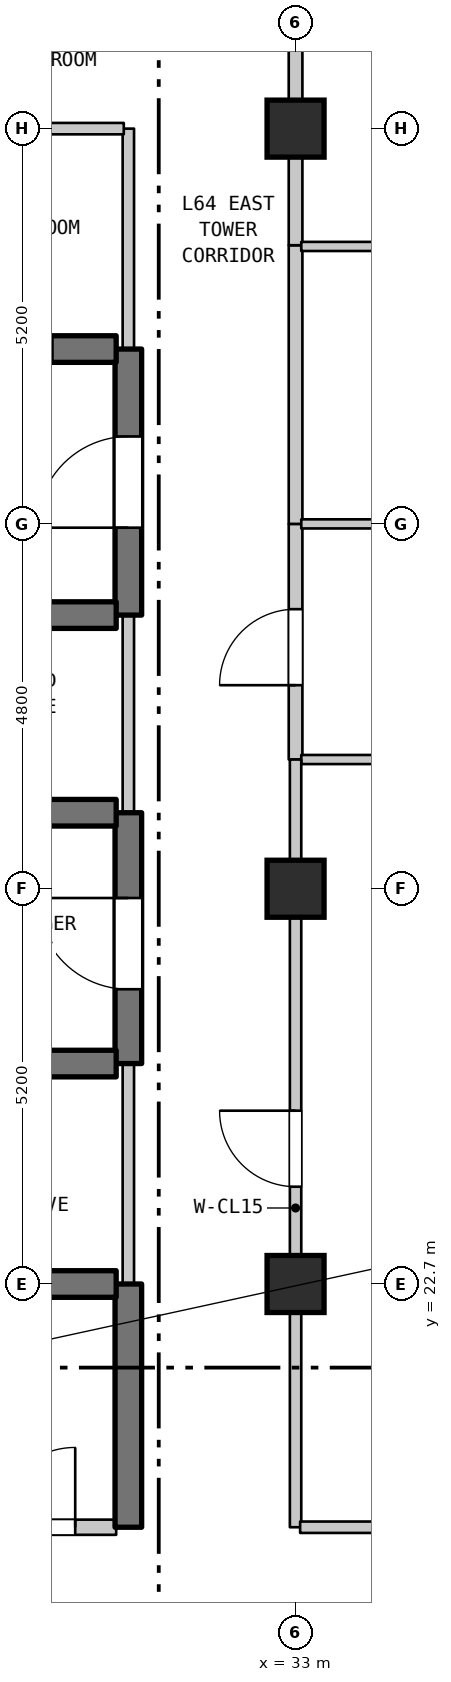
"""IFC4 building model, lengths in metres.
Left out: names, types, materials, properties, quantities, classifications, styles, units other than length and angle.
Written with IfcOpenShell. Run it as: python <this file> out.ifc"""

import sys

from ifc_helpers import new_model, si_unit, direction, frame, frame_2d, origin, origin_2d, place, context, subcontext, project, spatial, rectangle, extrude, element, fill, save


model = new_model("IFC4")
c1 = context("Model", 3, precision=1e-05, world=origin(), true_north=direction((0.0, 1.0)))
c2 = subcontext(c1, "Body", "Model", "MODEL_VIEW")
j1 = project(units=[si_unit("LENGTHUNIT", "METRE"), si_unit("PLANEANGLEUNIT", "RADIAN")], contexts=[c1])
p1 = place(None, origin())
s1 = spatial("IfcSite", under=j1, at=p1, CompositionType="ELEMENT")
p2 = place(p1, origin())
s2 = spatial("IfcBuilding", under=s1, at=p2, CompositionType="ELEMENT")
p3 = place(p2, frame((0.0, 0.0, 258.4)))
s3 = spatial("IfcBuildingStorey", under=s2, at=p3, CompositionType="ELEMENT", Elevation=258.4)
for number, where, z_axis, x_axis in (
    (1, (33.0, 22.7, 0.0), (0.0, 0.0, 1.0), (1.0, 0.0, 0.0)),
    (2, (33.0, 27.9, 0.0), (0.0, 0.0, 1.0), (1.0, 0.0, 0.0)),
    (3, (33.0, 37.9, 0.0), (0.0, 0.0, 1.0), (1.0, 0.0, 0.0)),
):
    element("IfcColumn", number, at=place(p3, frame(where, z_axis=z_axis, x_axis=x_axis)), inside=s3, PredefinedType="COLUMN", context=c2, shape_type="SweptSolid", body=[
        extrude(rectangle(XDim=0.75, YDim=0.75, at=origin_2d()), origin(), (0.0, 0.0, 1.0), 3.7),
    ])
p4 = place(p3, frame((30.8, 19.5, 0.0), z_axis=(0.0, 0.0, 1.0), x_axis=(0.0, 1.0, 0.0)))
e4 = element("IfcWall", 4, at=p4, inside=s3, PredefinedType="SHEAR", context=c2, shape_type="SweptSolid", body=[
    extrude(rectangle(XDim=3.2, YDim=0.35, at=frame_2d((1.6, 0.0))), origin(), (0.0, 0.0, 1.0), 3.39),
])
p5 = place(p3, frame((30.8, 22.7, 0.0), z_axis=(0.0, 0.0, 1.0), x_axis=(0.0, 1.0, 0.0)))
e5 = element("IfcWall", 5, at=p5, inside=s3, PredefinedType="STANDARD", context=c2, shape_type="SweptSolid", body=[
    extrude(rectangle(XDim=2.9, YDim=0.15, at=frame_2d((1.45, 0.0))), origin(), (0.0, 0.0, 1.0), 3.39),
])
p6 = place(p3, frame((30.8, 25.6, 0.0), z_axis=(0.0, 0.0, 1.0), x_axis=(0.0, 1.0, 0.0)))
e6 = element("IfcWall", 6, at=p6, inside=s3, PredefinedType="SHEAR", context=c2, shape_type="SweptSolid", body=[
    extrude(rectangle(XDim=3.3, YDim=0.35, at=frame_2d((1.65, 0.0))), origin(), (0.0, 0.0, 1.0), 3.39),
])
p7 = place(p6, frame((0.978, 0.0, 0.0)))
e7 = element("IfcOpeningElement", 7, at=p7, cuts=e6, PredefinedType="OPENING", context=c2, shape_type="SweptSolid", body=[
    extrude(rectangle(XDim=1.2, YDim=2.2, at=frame_2d((0.6, 1.1))), frame((0.0, 0.185, 0.0), z_axis=(0.0, -1.0, 0.0), x_axis=(1.0, 0.0, 0.0)), (0.0, 0.0, 1.0), 0.37),
])
p8 = place(p3, frame((30.8, 28.9, 0.0), z_axis=(0.0, 0.0, 1.0), x_axis=(0.0, 1.0, 0.0)))
e8 = element("IfcWall", 8, at=p8, inside=s3, PredefinedType="STANDARD", context=c2, shape_type="SweptSolid", body=[
    extrude(rectangle(XDim=2.6, YDim=0.15, at=frame_2d((1.3, 0.0))), origin(), (0.0, 0.0, 1.0), 3.39),
])
p9 = place(p3, frame((30.8, 31.5, 0.0), z_axis=(0.0, 0.0, 1.0), x_axis=(0.0, 1.0, 0.0)))
e9 = element("IfcWall", 9, at=p9, inside=s3, PredefinedType="SHEAR", context=c2, shape_type="SweptSolid", body=[
    extrude(rectangle(XDim=3.5, YDim=0.35, at=frame_2d((1.75, 0.0))), origin(), (0.0, 0.0, 1.0), 3.39),
])
p10 = place(p9, frame((1.15, 0.0, 0.0)))
e10 = element("IfcOpeningElement", 10, at=p10, cuts=e9, PredefinedType="OPENING", context=c2, shape_type="SweptSolid", body=[
    extrude(rectangle(XDim=1.2, YDim=2.2, at=frame_2d((0.6, 1.1))), frame((0.0, 0.185, 0.0), z_axis=(0.0, -1.0, 0.0), x_axis=(1.0, 0.0, 0.0)), (0.0, 0.0, 1.0), 0.37),
])
p11 = place(p3, frame((30.8, 35.0, 0.0), z_axis=(0.0, 0.0, 1.0), x_axis=(0.0, 1.0, 0.0)))
e11 = element("IfcWall", 11, at=p11, inside=s3, PredefinedType="STANDARD", context=c2, shape_type="SweptSolid", body=[
    extrude(rectangle(XDim=2.9, YDim=0.15, at=frame_2d((1.45, 0.0))), origin(), (0.0, 0.0, 1.0), 3.39),
])
p12 = place(p3, frame((33.0, 19.5, 0.0), z_axis=(0.0, 0.0, 1.0), x_axis=(0.0, 1.0, 0.0)))
e12 = element("IfcWall", 12, at=p12, inside=s3, PredefinedType="STANDARD", context=c2, shape_type="SweptSolid", body=[
    extrude(rectangle(XDim=8.4, YDim=0.15, at=frame_2d((4.2, 0.0))), origin(), (0.0, 0.0, 1.0), 3.1),
])
p13 = place(p12, frame((4.48, 0.0, 0.0)))
e13 = element("IfcOpeningElement", 13, at=p13, cuts=e12, PredefinedType="OPENING", context=c2, shape_type="SweptSolid", body=[
    extrude(rectangle(XDim=1.0, YDim=2.15, at=frame_2d((0.5, 1.075))), frame((0.0, 0.085, 0.0), z_axis=(0.0, -1.0, 0.0), x_axis=(1.0, 0.0, 0.0)), (0.0, 0.0, 1.0), 0.17),
])
p14 = place(p3, frame((33.0, 29.6, 0.0), z_axis=(0.0, 0.0, 1.0), x_axis=(0.0, 1.0, 0.0)))
e14 = element("IfcWall", 14, at=p14, inside=s3, PredefinedType="STANDARD", context=c2, shape_type="SweptSolid", body=[
    extrude(rectangle(XDim=3.1, YDim=0.18, at=frame_2d((1.55, 0.0))), origin(), (0.0, 0.0, 1.0), 2.89),
])
p15 = place(p14, frame((0.978, 0.0, 0.0)))
e15 = element("IfcOpeningElement", 15, at=p15, cuts=e14, PredefinedType="OPENING", context=c2, shape_type="SweptSolid", body=[
    extrude(rectangle(XDim=1.0, YDim=2.15, at=frame_2d((0.5, 1.075))), frame((0.0, 0.1, 0.0), z_axis=(0.0, -1.0, 0.0), x_axis=(1.0, 0.0, 0.0)), (0.0, 0.0, 1.0), 0.2),
])
p16 = place(p3, frame((33.0, 32.7, 0.0), z_axis=(0.0, 0.0, 1.0), x_axis=(0.0, 1.0, 0.0)))
e16 = element("IfcWall", 16, at=p16, inside=s3, PredefinedType="STANDARD", context=c2, shape_type="SweptSolid", body=[
    extrude(rectangle(XDim=3.666, YDim=0.18, at=frame_2d((1.833, 0.0))), origin(), (0.0, 0.0, 1.0), 2.89),
])
p17 = place(p3, frame((33.0, 36.366, 0.0), z_axis=(0.0, 0.0, 1.0), x_axis=(0.0, 1.0, 0.0)))
e17 = element("IfcWall", 17, at=p17, inside=s3, PredefinedType="STANDARD", context=c2, shape_type="SweptSolid", body=[
    extrude(rectangle(XDim=1.534, YDim=0.18, at=frame_2d((0.767, 0.0))), origin(), (0.0, 0.0, 1.0), 2.89),
])
p18 = place(p3, frame((28.585, 19.5, 0.0), z_axis=(0.0, 0.0, 1.0), x_axis=(1.0, 0.0, 0.0)))
e18 = element("IfcWall", 18, at=p18, inside=s3, PredefinedType="STANDARD", context=c2, shape_type="SweptSolid", body=[
    extrude(rectangle(XDim=2.055, YDim=0.2, at=frame_2d((1.027, 0.0))), origin(), (0.0, 0.0, 1.0), 3.39),
])
p19 = place(p18, frame((0.466, 0.0, 0.0)))
e19 = element("IfcOpeningElement", 19, at=p19, cuts=e18, PredefinedType="OPENING", context=c2, shape_type="SweptSolid", body=[
    extrude(rectangle(XDim=1.05, YDim=2.15, at=frame_2d((0.525, 1.075))), frame((0.0, 0.11, 0.0), z_axis=(0.0, -1.0, 0.0), x_axis=(1.0, 0.0, 0.0)), (0.0, 0.0, 1.0), 0.22),
])
p20 = place(p3, frame((33.06, 19.5, 0.0), z_axis=(0.0, 0.0, 1.0), x_axis=(1.0, 0.0, 0.0)))
e20 = element("IfcWall", 20, at=p20, inside=s3, PredefinedType="STANDARD", context=c2, shape_type="SweptSolid", body=[
    extrude(rectangle(XDim=8.323, YDim=0.15, at=frame_2d((4.162, 0.0))), origin(), (0.0, 0.0, 1.0), 3.39),
])
p21 = place(p20, frame((3.583, 0.0, 0.0)))
e21 = element("IfcOpeningElement", 21, at=p21, cuts=e20, PredefinedType="OPENING", context=c2, shape_type="SweptSolid", body=[
    extrude(rectangle(XDim=1.0, YDim=2.15, at=frame_2d((0.5, 1.075))), frame((0.0, 0.085, 0.0), z_axis=(0.0, -1.0, 0.0), x_axis=(1.0, 0.0, 0.0)), (0.0, 0.0, 1.0), 0.17),
])
p22 = place(p3, frame((28.585, 22.7, 0.0), z_axis=(0.0, 0.0, 1.0), x_axis=(1.0, 0.0, 0.0)))
e22 = element("IfcWall", 22, at=p22, inside=s3, PredefinedType="SHEAR", context=c2, shape_type="SweptSolid", body=[
    extrude(rectangle(XDim=2.055, YDim=0.35, at=frame_2d((1.027, 0.0))), origin(), (0.0, 0.0, 1.0), 3.39),
])
p23 = place(p3, frame((27.46, 25.6, 0.0), z_axis=(0.0, 0.0, 1.0), x_axis=(1.0, 0.0, 0.0)))
e23 = element("IfcWall", 23, at=p23, inside=s3, PredefinedType="SHEAR", context=c2, shape_type="SweptSolid", body=[
    extrude(rectangle(XDim=3.18, YDim=0.35, at=frame_2d((1.59, 0.0))), origin(), (0.0, 0.0, 1.0), 3.39),
])
p24 = place(p23, frame((1.115, 0.0, 0.0)))
e24 = element("IfcOpeningElement", 24, at=p24, cuts=e23, PredefinedType="OPENING", context=c2, shape_type="SweptSolid", body=[
    extrude(rectangle(XDim=0.95, YDim=2.15, at=frame_2d((0.475, 1.075))), frame((0.0, 0.185, 0.0), z_axis=(0.0, -1.0, 0.0), x_axis=(1.0, 0.0, 0.0)), (0.0, 0.0, 1.0), 0.37),
])
p25 = place(p3, frame((27.46, 28.9, 0.0), z_axis=(0.0, 0.0, 1.0), x_axis=(1.0, 0.0, 0.0)))
e25 = element("IfcWall", 25, at=p25, inside=s3, PredefinedType="SHEAR", context=c2, shape_type="SweptSolid", body=[
    extrude(rectangle(XDim=3.18, YDim=0.35, at=frame_2d((1.59, 0.0))), origin(), (0.0, 0.0, 1.0), 3.39),
])
p26 = place(p25, frame((1.115, 0.0, 0.0)))
e26 = element("IfcOpeningElement", 26, at=p26, cuts=e25, PredefinedType="OPENING", context=c2, shape_type="SweptSolid", body=[
    extrude(rectangle(XDim=0.95, YDim=2.15, at=frame_2d((0.475, 1.075))), frame((0.0, 0.185, 0.0), z_axis=(0.0, -1.0, 0.0), x_axis=(1.0, 0.0, 0.0)), (0.0, 0.0, 1.0), 0.37),
])
p27 = place(p3, frame((33.075, 29.6, 0.0), z_axis=(0.0, 0.0, 1.0), x_axis=(1.0, 0.0, 0.0)))
e27 = element("IfcWall", 27, at=p27, inside=s3, PredefinedType="PARTITIONING", context=c2, shape_type="SweptSolid", body=[
    extrude(rectangle(XDim=11.522, YDim=0.12, at=frame_2d((5.761, 0.0))), origin(), (0.0, 0.0, 1.0), 3.39),
])
p28 = place(p3, frame((27.46, 31.5, 0.0), z_axis=(0.0, 0.0, 1.0), x_axis=(1.0, 0.0, 0.0)))
e28 = element("IfcWall", 28, at=p28, inside=s3, PredefinedType="SHEAR", context=c2, shape_type="SweptSolid", body=[
    extrude(rectangle(XDim=3.18, YDim=0.35, at=frame_2d((1.59, 0.0))), origin(), (0.0, 0.0, 1.0), 3.39),
])
p29 = place(p3, frame((33.075, 32.7, 0.0), z_axis=(0.0, 0.0, 1.0), x_axis=(1.0, 0.0, 0.0)))
e29 = element("IfcWall", 29, at=p29, inside=s3, PredefinedType="PARTITIONING", context=c2, shape_type="SweptSolid", body=[
    extrude(rectangle(XDim=4.46, YDim=0.12, at=frame_2d((2.23, 0.0))), origin(), (0.0, 0.0, 1.0), 3.39),
])
p30 = place(p3, frame((28.045, 35.0, 0.0), z_axis=(0.0, 0.0, 1.0), x_axis=(1.0, 0.0, 0.0)))
e30 = element("IfcWall", 30, at=p30, inside=s3, PredefinedType="SHEAR", context=c2, shape_type="SweptSolid", body=[
    extrude(rectangle(XDim=2.595, YDim=0.35, at=frame_2d((1.297, 0.0))), origin(), (0.0, 0.0, 1.0), 3.39),
])
p31 = place(p30, frame((0.806, 0.0, 0.0)))
e31 = element("IfcOpeningElement", 31, at=p31, cuts=e30, PredefinedType="OPENING", context=c2, shape_type="SweptSolid", body=[
    extrude(rectangle(XDim=0.95, YDim=2.15, at=frame_2d((0.475, 1.075))), frame((0.0, 0.185, 0.0), z_axis=(0.0, -1.0, 0.0), x_axis=(1.0, 0.0, 0.0)), (0.0, 0.0, 1.0), 0.37),
])
p32 = place(p3, frame((33.075, 36.35, 0.0), z_axis=(0.0, 0.0, 1.0), x_axis=(1.0, 0.0, 0.0)))
e32 = element("IfcWall", 32, at=p32, inside=s3, PredefinedType="PARTITIONING", context=c2, shape_type="SweptSolid", body=[
    extrude(rectangle(XDim=4.46, YDim=0.12, at=frame_2d((2.23, 0.0))), origin(), (0.0, 0.0, 1.0), 3.39),
])
p33 = place(p3, frame((28.045, 37.9, 0.0), z_axis=(0.0, 0.0, 1.0), x_axis=(1.0, 0.0, 0.0)))
e33 = element("IfcWall", 33, at=p33, inside=s3, PredefinedType="STANDARD", context=c2, shape_type="SweptSolid", body=[
    extrude(rectangle(XDim=2.695, YDim=0.15, at=frame_2d((1.348, 0.0))), origin(), (0.0, 0.0, 1.0), 2.89),
])
p34 = place(p3, frame((33.0, 27.9, 0.0), z_axis=(0.0, 0.0, 1.0), x_axis=(0.0, 1.0, 0.0)))
e34 = element("IfcWall", 34, at=p34, inside=s3, PredefinedType="STANDARD", context=c2, shape_type="SweptSolid", body=[
    extrude(rectangle(XDim=1.7, YDim=0.15, at=frame_2d((0.85, 0.0))), origin(), (0.0, 0.0, 1.0), 2.89),
])
p35 = place(p3, frame((33.0, 37.9, 0.0), z_axis=(0.0, 0.0, 1.0), x_axis=(0.0, 1.0, 0.0)))
e35 = element("IfcWall", 35, at=p35, inside=s3, PredefinedType="STANDARD", context=c2, shape_type="SweptSolid", body=[
    extrude(rectangle(XDim=1.85, YDim=0.18, at=frame_2d((0.925, 0.0))), origin(), (0.0, 0.0, 1.0), 2.79),
])
p36 = place(p7, origin())
e36 = element("IfcDoor", 36, at=p36, inside=s3, OperationType="SINGLE_SWING_RIGHT", PredefinedType="DOOR", context=c2, shape_type="SweptSolid", body=[
    extrude(rectangle(XDim=1.2, YDim=2.2, at=frame_2d((0.6, 1.1))), frame((0.0, 0.025, 0.0), z_axis=(0.0, -1.0, 0.0), x_axis=(1.0, 0.0, 0.0)), (0.0, 0.0, 1.0), 0.05),
])
fill(e7, e36)
p37 = place(p10, origin())
e37 = element("IfcDoor", 37, at=p37, inside=s3, OperationType="SINGLE_SWING_LEFT", PredefinedType="DOOR", context=c2, shape_type="SweptSolid", body=[
    extrude(rectangle(XDim=1.2, YDim=2.2, at=frame_2d((0.6, 1.1))), frame((0.0, 0.025, 0.0), z_axis=(0.0, -1.0, 0.0), x_axis=(1.0, 0.0, 0.0)), (0.0, 0.0, 1.0), 0.05),
])
fill(e10, e37)
p38 = place(p13, origin())
e38 = element("IfcDoor", 38, at=p38, inside=s3, OperationType="SINGLE_SWING_RIGHT", PredefinedType="DOOR", context=c2, shape_type="SweptSolid", body=[
    extrude(rectangle(XDim=1.0, YDim=2.15, at=frame_2d((0.5, 1.075))), frame((0.0, 0.025, 0.0), z_axis=(0.0, -1.0, 0.0), x_axis=(1.0, 0.0, 0.0)), (0.0, 0.0, 1.0), 0.05),
])
fill(e13, e38)
p39 = place(p15, origin())
e39 = element("IfcDoor", 39, at=p39, inside=s3, OperationType="SINGLE_SWING_LEFT", PredefinedType="DOOR", context=c2, shape_type="SweptSolid", body=[
    extrude(rectangle(XDim=1.0, YDim=2.15, at=frame_2d((0.5, 1.075))), frame((0.0, 0.025, 0.0), z_axis=(0.0, -1.0, 0.0), x_axis=(1.0, 0.0, 0.0)), (0.0, 0.0, 1.0), 0.05),
])
fill(e15, e39)
p40 = place(p19, origin())
e40 = element("IfcDoor", 40, at=p40, inside=s3, OperationType="SINGLE_SWING_RIGHT", PredefinedType="DOOR", context=c2, shape_type="SweptSolid", body=[
    extrude(rectangle(XDim=1.05, YDim=2.15, at=frame_2d((0.525, 1.075))), frame((0.0, 0.025, 0.0), z_axis=(0.0, -1.0, 0.0), x_axis=(1.0, 0.0, 0.0)), (0.0, 0.0, 1.0), 0.05),
])
fill(e19, e40)
p41 = place(p31, frame((0.95, 0.0, 0.0), z_axis=(0.0, 0.0, 1.0), x_axis=(-1.0, 0.0, 0.0)))
e41 = element("IfcDoor", 41, at=p41, inside=s3, OperationType="SINGLE_SWING_LEFT", PredefinedType="DOOR", context=c2, shape_type="SweptSolid", body=[
    extrude(rectangle(XDim=0.95, YDim=2.15, at=frame_2d((0.475, 1.075))), frame((0.0, 0.025, 0.0), z_axis=(0.0, -1.0, 0.0), x_axis=(1.0, 0.0, 0.0)), (0.0, 0.0, 1.0), 0.05),
])
fill(e31, e41)
save(model, sys.argv[1])
